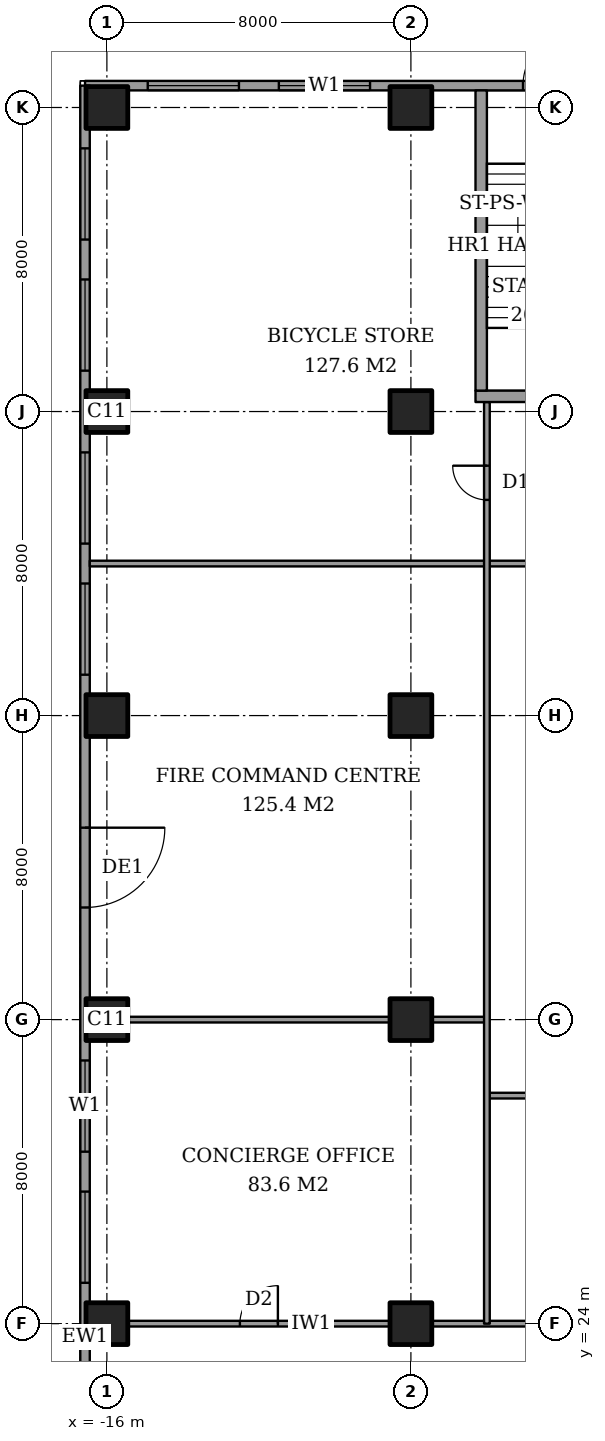
"""IFC4 building model, lengths in metres.
Left out: names, types, materials, properties, quantities, classifications, styles, units other than length and angle.
Written with IfcOpenShell. Run it as: python <this file> out.ifc"""

import sys

from ifc_helpers import new_model, si_unit, direction, frame, frame_2d, origin, origin_2d, place, context, subcontext, project, spatial, rectangle, extrude, element, fill, save


model = new_model("IFC4")
c1 = context("Model", 3, precision=1e-05, world=origin(), true_north=direction((0.0, 1.0)))
c2 = subcontext(c1, "Body", "Model", "MODEL_VIEW")
j1 = project(units=[si_unit("LENGTHUNIT", "METRE"), si_unit("PLANEANGLEUNIT", "RADIAN")], contexts=[c1])
p1 = place(None, origin())
s1 = spatial("IfcSite", under=j1, at=p1, CompositionType="ELEMENT")
p2 = place(p1, origin())
s2 = spatial("IfcBuilding", under=s1, at=p2, CompositionType="ELEMENT")
p3 = place(p2, origin())
s3 = spatial("IfcBuildingStorey", under=s2, at=p3, CompositionType="ELEMENT", Elevation=0.0)
for number, where, z_axis, x_axis in (
    (1, (-16.0, 24.0, 0.0), (0.0, 0.0, 1.0), (1.0, 0.0, 0.0)),
    (2, (-16.0, 32.0, 0.0), (0.0, 0.0, 1.0), (1.0, 0.0, 0.0)),
    (3, (-16.0, 40.0, 0.0), (0.0, 0.0, 1.0), (1.0, 0.0, 0.0)),
    (4, (-16.0, 48.0, 0.0), (0.0, 0.0, 1.0), (1.0, 0.0, 0.0)),
    (5, (-16.0, 56.0, 0.0), (0.0, 0.0, 1.0), (1.0, 0.0, 0.0)),
    (6, (-8.0, 24.0, 0.0), (0.0, 0.0, 1.0), (1.0, 0.0, 0.0)),
    (7, (-8.0, 32.0, 0.0), (0.0, 0.0, 1.0), (1.0, 0.0, 0.0)),
    (8, (-8.0, 40.0, 0.0), (0.0, 0.0, 1.0), (1.0, 0.0, 0.0)),
    (9, (-8.0, 48.0, 0.0), (0.0, 0.0, 1.0), (1.0, 0.0, 0.0)),
    (10, (-8.0, 56.0, 0.0), (0.0, 0.0, 1.0), (1.0, 0.0, 0.0)),
):
    element("IfcColumn", number, at=place(p3, frame(where, z_axis=z_axis, x_axis=x_axis)), inside=s3, PredefinedType="COLUMN", context=c2, shape_type="SweptSolid", body=[
        extrude(rectangle(XDim=1.1, YDim=1.1, at=origin_2d()), origin(), (0.0, 0.0, 1.0), 6.0),
    ])
p4 = place(p3, frame((74.825, 56.575, 0.0), z_axis=(0.0, 0.0, 1.0), x_axis=(-1.0, 0.0, 0.0)))
e11 = element("IfcWall", 11, at=p4, inside=s3, PredefinedType="SOLIDWALL", context=c2, shape_type="SweptSolid", body=[
    extrude(rectangle(XDim=91.4, YDim=0.25, at=frame_2d((45.7, 0.0))), origin(), (0.0, 0.0, 1.0), 6.0),
])
p5 = place(p4, frame((27.025, 0.0, 0.0)))
e12 = element("IfcOpeningElement", 12, at=p5, cuts=e11, PredefinedType="OPENING", context=c2, shape_type="SweptSolid", body=[
    extrude(rectangle(XDim=3.6, YDim=3.6, at=frame_2d((1.8, 1.8))), frame((0.0, 0.135, 0.0), z_axis=(0.0, -1.0, 0.0), x_axis=(1.0, 0.0, 0.0)), (0.0, 0.0, 1.0), 0.27),
])
p6 = place(p4, frame((9.863, 0.0, 0.3)))
e13 = element("IfcOpeningElement", 13, at=p6, cuts=e11, PredefinedType="OPENING", context=c2, shape_type="SweptSolid", body=[
    extrude(rectangle(XDim=2.4, YDim=3.6, at=frame_2d((1.2, 1.8))), frame((0.0, 0.135, 0.0), z_axis=(0.0, -1.0, 0.0), x_axis=(1.0, 0.0, 0.0)), (0.0, 0.0, 1.0), 0.27),
])
p7 = place(p4, frame((13.238, 0.0, 0.3)))
e14 = element("IfcOpeningElement", 14, at=p7, cuts=e11, PredefinedType="OPENING", context=c2, shape_type="SweptSolid", body=[
    extrude(rectangle(XDim=2.4, YDim=3.6, at=frame_2d((1.2, 1.8))), frame((0.0, 0.135, 0.0), z_axis=(0.0, -1.0, 0.0), x_axis=(1.0, 0.0, 0.0)), (0.0, 0.0, 1.0), 0.27),
])
p8 = place(p4, frame((17.975, 0.0, 0.3)))
e15 = element("IfcOpeningElement", 15, at=p8, cuts=e11, PredefinedType="OPENING", context=c2, shape_type="SweptSolid", body=[
    extrude(rectangle(XDim=2.4, YDim=3.6, at=frame_2d((1.2, 1.8))), frame((0.0, 0.135, 0.0), z_axis=(0.0, -1.0, 0.0), x_axis=(1.0, 0.0, 0.0)), (0.0, 0.0, 1.0), 0.27),
])
p9 = place(p4, frame((21.275, 0.0, 0.3)))
e16 = element("IfcOpeningElement", 16, at=p9, cuts=e11, PredefinedType="OPENING", context=c2, shape_type="SweptSolid", body=[
    extrude(rectangle(XDim=2.4, YDim=3.6, at=frame_2d((1.2, 1.8))), frame((0.0, 0.135, 0.0), z_axis=(0.0, -1.0, 0.0), x_axis=(1.0, 0.0, 0.0)), (0.0, 0.0, 1.0), 0.27),
])
p10 = place(p4, frame((34.15, 0.0, 0.3)))
e17 = element("IfcOpeningElement", 17, at=p10, cuts=e11, PredefinedType="OPENING", context=c2, shape_type="SweptSolid", body=[
    extrude(rectangle(XDim=2.4, YDim=3.6, at=frame_2d((1.2, 1.8))), frame((0.0, 0.135, 0.0), z_axis=(0.0, -1.0, 0.0), x_axis=(1.0, 0.0, 0.0)), (0.0, 0.0, 1.0), 0.27),
])
p11 = place(p4, frame((38.1, 0.0, 0.3)))
e18 = element("IfcOpeningElement", 18, at=p11, cuts=e11, PredefinedType="OPENING", context=c2, shape_type="SweptSolid", body=[
    extrude(rectangle(XDim=2.4, YDim=3.6, at=frame_2d((1.2, 1.8))), frame((0.0, 0.135, 0.0), z_axis=(0.0, -1.0, 0.0), x_axis=(1.0, 0.0, 0.0)), (0.0, 0.0, 1.0), 0.27),
])
p12 = place(p4, frame((43.15, 0.0, 0.3)))
e19 = element("IfcOpeningElement", 19, at=p12, cuts=e11, PredefinedType="OPENING", context=c2, shape_type="SweptSolid", body=[
    extrude(rectangle(XDim=2.4, YDim=3.6, at=frame_2d((1.2, 1.8))), frame((0.0, 0.135, 0.0), z_axis=(0.0, -1.0, 0.0), x_axis=(1.0, 0.0, 0.0)), (0.0, 0.0, 1.0), 0.27),
])
p13 = place(p4, frame((47.1, 0.0, 0.3)))
e20 = element("IfcOpeningElement", 20, at=p13, cuts=e11, PredefinedType="OPENING", context=c2, shape_type="SweptSolid", body=[
    extrude(rectangle(XDim=2.4, YDim=3.6, at=frame_2d((1.2, 1.8))), frame((0.0, 0.135, 0.0), z_axis=(0.0, -1.0, 0.0), x_axis=(1.0, 0.0, 0.0)), (0.0, 0.0, 1.0), 0.27),
])
p14 = place(p4, frame((53.775, 0.0, 0.0)))
e21 = element("IfcOpeningElement", 21, at=p14, cuts=e11, PredefinedType="OPENING", context=c2, shape_type="SweptSolid", body=[
    extrude(rectangle(XDim=2.1, YDim=2.4, at=frame_2d((1.05, 1.2))), frame((0.0, 0.135, 0.0), z_axis=(0.0, -1.0, 0.0), x_axis=(1.0, 0.0, 0.0)), (0.0, 0.0, 1.0), 0.27),
])
p15 = place(p4, frame((61.775, 0.0, 0.0)))
e22 = element("IfcOpeningElement", 22, at=p15, cuts=e11, PredefinedType="OPENING", context=c2, shape_type="SweptSolid", body=[
    extrude(rectangle(XDim=2.1, YDim=2.4, at=frame_2d((1.05, 1.2))), frame((0.0, 0.135, 0.0), z_axis=(0.0, -1.0, 0.0), x_axis=(1.0, 0.0, 0.0)), (0.0, 0.0, 1.0), 0.27),
])
p16 = place(p4, frame((69.775, 0.0, 0.0)))
e23 = element("IfcOpeningElement", 23, at=p16, cuts=e11, PredefinedType="OPENING", context=c2, shape_type="SweptSolid", body=[
    extrude(rectangle(XDim=2.1, YDim=2.4, at=frame_2d((1.05, 1.2))), frame((0.0, 0.135, 0.0), z_axis=(0.0, -1.0, 0.0), x_axis=(1.0, 0.0, 0.0)), (0.0, 0.0, 1.0), 0.27),
])
p17 = place(p4, frame((83.9, 0.0, 0.3)))
e24 = element("IfcOpeningElement", 24, at=p17, cuts=e11, PredefinedType="OPENING", context=c2, shape_type="SweptSolid", body=[
    extrude(rectangle(XDim=2.4, YDim=3.6, at=frame_2d((1.2, 1.8))), frame((0.0, 0.135, 0.0), z_axis=(0.0, -1.0, 0.0), x_axis=(1.0, 0.0, 0.0)), (0.0, 0.0, 1.0), 0.27),
])
p18 = place(p4, frame((87.35, 0.0, 0.3)))
e25 = element("IfcOpeningElement", 25, at=p18, cuts=e11, PredefinedType="OPENING", context=c2, shape_type="SweptSolid", body=[
    extrude(rectangle(XDim=2.4, YDim=3.6, at=frame_2d((1.2, 1.8))), frame((0.0, 0.135, 0.0), z_axis=(0.0, -1.0, 0.0), x_axis=(1.0, 0.0, 0.0)), (0.0, 0.0, 1.0), 0.27),
])
p19 = place(p4, frame((5.275, 0.0, 0.0), z_axis=(0.0, 0.0, 1.0), x_axis=(-1.0, 0.0, 0.0)))
e26 = element("IfcOpeningElement", 26, at=p19, cuts=e11, PredefinedType="OPENING", context=c2, shape_type="SweptSolid", body=[
    extrude(rectangle(XDim=1.5, YDim=2.1, at=frame_2d((0.75, 1.05))), frame((0.0, 0.135, 0.0), z_axis=(0.0, -1.0, 0.0), x_axis=(1.0, 0.0, 0.0)), (0.0, 0.0, 1.0), 0.27),
])
p20 = place(p4, frame((79.875, 0.0, 0.0), z_axis=(0.0, 0.0, 1.0), x_axis=(-1.0, 0.0, 0.0)))
e27 = element("IfcOpeningElement", 27, at=p20, cuts=e11, PredefinedType="OPENING", context=c2, shape_type="SweptSolid", body=[
    extrude(rectangle(XDim=1.5, YDim=2.1, at=frame_2d((0.75, 1.05))), frame((0.0, 0.135, 0.0), z_axis=(0.0, -1.0, 0.0), x_axis=(1.0, 0.0, 0.0)), (0.0, 0.0, 1.0), 0.27),
])
p21 = place(p3, frame((-16.575, 56.575, 0.0), z_axis=(0.0, 0.0, 1.0), x_axis=(0.0, -1.0, 0.0)))
e28 = element("IfcWall", 28, at=p21, inside=s3, PredefinedType="SOLIDWALL", context=c2, shape_type="SweptSolid", body=[
    extrude(rectangle(XDim=73.15, YDim=0.25, at=frame_2d((36.575, 0.0))), origin(), (0.0, 0.0, 1.0), 6.0),
])
p22 = place(p21, frame((1.65, 0.0, 0.3)))
e29 = element("IfcOpeningElement", 29, at=p22, cuts=e28, PredefinedType="OPENING", context=c2, shape_type="SweptSolid", body=[
    extrude(rectangle(XDim=2.4, YDim=3.6, at=frame_2d((1.2, 1.8))), frame((0.0, 0.135, 0.0), z_axis=(0.0, -1.0, 0.0), x_axis=(1.0, 0.0, 0.0)), (0.0, 0.0, 1.0), 0.27),
])
p23 = place(p21, frame((5.1, 0.0, 0.3)))
e30 = element("IfcOpeningElement", 30, at=p23, cuts=e28, PredefinedType="OPENING", context=c2, shape_type="SweptSolid", body=[
    extrude(rectangle(XDim=2.4, YDim=3.6, at=frame_2d((1.2, 1.8))), frame((0.0, 0.135, 0.0), z_axis=(0.0, -1.0, 0.0), x_axis=(1.0, 0.0, 0.0)), (0.0, 0.0, 1.0), 0.27),
])
p24 = place(p21, frame((9.65, 0.0, 0.3)))
e31 = element("IfcOpeningElement", 31, at=p24, cuts=e28, PredefinedType="OPENING", context=c2, shape_type="SweptSolid", body=[
    extrude(rectangle(XDim=2.4, YDim=3.6, at=frame_2d((1.2, 1.8))), frame((0.0, 0.135, 0.0), z_axis=(0.0, -1.0, 0.0), x_axis=(1.0, 0.0, 0.0)), (0.0, 0.0, 1.0), 0.27),
])
p25 = place(p21, frame((19.525, 0.0, 0.0)))
e32 = element("IfcOpeningElement", 32, at=p25, cuts=e28, PredefinedType="OPENING", context=c2, shape_type="SweptSolid", body=[
    extrude(rectangle(XDim=2.1, YDim=2.4, at=frame_2d((1.05, 1.2))), frame((0.0, 0.135, 0.0), z_axis=(0.0, -1.0, 0.0), x_axis=(1.0, 0.0, 0.0)), (0.0, 0.0, 1.0), 0.27),
])
p26 = place(p21, frame((13.1, 0.0, 0.3)))
e33 = element("IfcOpeningElement", 33, at=p26, cuts=e28, PredefinedType="OPENING", context=c2, shape_type="SweptSolid", body=[
    extrude(rectangle(XDim=2.4, YDim=3.6, at=frame_2d((1.2, 1.8))), frame((0.0, 0.135, 0.0), z_axis=(0.0, -1.0, 0.0), x_axis=(1.0, 0.0, 0.0)), (0.0, 0.0, 1.0), 0.27),
])
p27 = place(p21, frame((25.65, 0.0, 0.3)))
e34 = element("IfcOpeningElement", 34, at=p27, cuts=e28, PredefinedType="OPENING", context=c2, shape_type="SweptSolid", body=[
    extrude(rectangle(XDim=2.4, YDim=3.6, at=frame_2d((1.2, 1.8))), frame((0.0, 0.135, 0.0), z_axis=(0.0, -1.0, 0.0), x_axis=(1.0, 0.0, 0.0)), (0.0, 0.0, 1.0), 0.27),
])
p28 = place(p21, frame((29.1, 0.0, 0.3)))
e35 = element("IfcOpeningElement", 35, at=p28, cuts=e28, PredefinedType="OPENING", context=c2, shape_type="SweptSolid", body=[
    extrude(rectangle(XDim=2.4, YDim=3.6, at=frame_2d((1.2, 1.8))), frame((0.0, 0.135, 0.0), z_axis=(0.0, -1.0, 0.0), x_axis=(1.0, 0.0, 0.0)), (0.0, 0.0, 1.0), 0.27),
])
p29 = place(p21, frame((35.525, 0.0, 0.0)))
e36 = element("IfcOpeningElement", 36, at=p29, cuts=e28, PredefinedType="OPENING", context=c2, shape_type="SweptSolid", body=[
    extrude(rectangle(XDim=2.1, YDim=2.4, at=frame_2d((1.05, 1.2))), frame((0.0, 0.135, 0.0), z_axis=(0.0, -1.0, 0.0), x_axis=(1.0, 0.0, 0.0)), (0.0, 0.0, 1.0), 0.27),
])
p30 = place(p21, frame((43.525, 0.0, 0.0)))
e37 = element("IfcOpeningElement", 37, at=p30, cuts=e28, PredefinedType="OPENING", context=c2, shape_type="SweptSolid", body=[
    extrude(rectangle(XDim=2.1, YDim=2.4, at=frame_2d((1.05, 1.2))), frame((0.0, 0.135, 0.0), z_axis=(0.0, -1.0, 0.0), x_axis=(1.0, 0.0, 0.0)), (0.0, 0.0, 1.0), 0.27),
])
p31 = place(p21, frame((51.525, 0.0, 0.0)))
e38 = element("IfcOpeningElement", 38, at=p31, cuts=e28, PredefinedType="OPENING", context=c2, shape_type="SweptSolid", body=[
    extrude(rectangle(XDim=2.1, YDim=2.4, at=frame_2d((1.05, 1.2))), frame((0.0, 0.135, 0.0), z_axis=(0.0, -1.0, 0.0), x_axis=(1.0, 0.0, 0.0)), (0.0, 0.0, 1.0), 0.27),
])
p32 = place(p21, frame((57.525, 0.0, 0.0)))
e39 = element("IfcOpeningElement", 39, at=p32, cuts=e28, PredefinedType="OPENING", context=c2, shape_type="SweptSolid", body=[
    extrude(rectangle(XDim=2.1, YDim=2.4, at=frame_2d((1.05, 1.2))), frame((0.0, 0.135, 0.0), z_axis=(0.0, -1.0, 0.0), x_axis=(1.0, 0.0, 0.0)), (0.0, 0.0, 1.0), 0.27),
])
p33 = place(p21, frame((61.1, 0.0, 0.3)))
e40 = element("IfcOpeningElement", 40, at=p33, cuts=e28, PredefinedType="OPENING", context=c2, shape_type="SweptSolid", body=[
    extrude(rectangle(XDim=2.4, YDim=3.6, at=frame_2d((1.2, 1.8))), frame((0.0, 0.135, 0.0), z_axis=(0.0, -1.0, 0.0), x_axis=(1.0, 0.0, 0.0)), (0.0, 0.0, 1.0), 0.27),
])
p34 = place(p21, frame((65.65, 0.0, 0.3)))
e41 = element("IfcOpeningElement", 41, at=p34, cuts=e28, PredefinedType="OPENING", context=c2, shape_type="SweptSolid", body=[
    extrude(rectangle(XDim=2.4, YDim=3.6, at=frame_2d((1.2, 1.8))), frame((0.0, 0.135, 0.0), z_axis=(0.0, -1.0, 0.0), x_axis=(1.0, 0.0, 0.0)), (0.0, 0.0, 1.0), 0.27),
])
p35 = place(p21, frame((69.1, 0.0, 0.3)))
e42 = element("IfcOpeningElement", 42, at=p35, cuts=e28, PredefinedType="OPENING", context=c2, shape_type="SweptSolid", body=[
    extrude(rectangle(XDim=2.4, YDim=3.6, at=frame_2d((1.2, 1.8))), frame((0.0, 0.135, 0.0), z_axis=(0.0, -1.0, 0.0), x_axis=(1.0, 0.0, 0.0)), (0.0, 0.0, 1.0), 0.27),
])
p36 = place(p3, frame((-15.45, 24.0, 0.0), z_axis=(0.0, 0.0, 1.0), x_axis=(1.0, 0.0, 0.0)))
e43 = element("IfcWall", 43, at=p36, inside=s3, PredefinedType="PARTITIONING", context=c2, shape_type="SweptSolid", body=[
    extrude(rectangle(XDim=6.9, YDim=0.15, at=frame_2d((3.45, 0.0))), origin(), (0.0, 0.0, 1.0), 4.3),
])
p37 = place(p36, frame((2.95, 0.0, 0.0)))
e44 = element("IfcOpeningElement", 44, at=p37, cuts=e43, PredefinedType="OPENING", context=c2, shape_type="SweptSolid", body=[
    extrude(rectangle(XDim=1.0, YDim=2.1, at=frame_2d((0.5, 1.05))), frame((0.0, 0.085, 0.0), z_axis=(0.0, -1.0, 0.0), x_axis=(1.0, 0.0, 0.0)), (0.0, 0.0, 1.0), 0.17),
])
p38 = place(p3, frame((-7.45, 24.0, 0.0), z_axis=(0.0, 0.0, 1.0), x_axis=(1.0, 0.0, 0.0)))
e45 = element("IfcWall", 45, at=p38, inside=s3, PredefinedType="PARTITIONING", context=c2, shape_type="SweptSolid", body=[
    extrude(rectangle(XDim=6.8, YDim=0.15, at=frame_2d((3.4, 0.0))), origin(), (0.0, 0.0, 1.0), 4.3),
])
p39 = place(p3, frame((-6.0, 30.0, 0.0), z_axis=(0.0, 0.0, 1.0), x_axis=(1.0, 0.0, 0.0)))
e46 = element("IfcWall", 46, at=p39, inside=s3, PredefinedType="PARTITIONING", context=c2, shape_type="SweptSolid", body=[
    extrude(rectangle(XDim=22.0, YDim=0.15, at=frame_2d((11.0, 0.0))), origin(), (0.0, 0.0, 1.0), 5.7),
])
p40 = place(p39, frame((7.15, 0.0, 0.0)))
e47 = element("IfcOpeningElement", 47, at=p40, cuts=e46, PredefinedType="OPENING", context=c2, shape_type="SweptSolid", body=[
    extrude(rectangle(XDim=0.9, YDim=2.1, at=frame_2d((0.45, 1.05))), frame((0.0, 0.085, 0.0), z_axis=(0.0, -1.0, 0.0), x_axis=(1.0, 0.0, 0.0)), (0.0, 0.0, 1.0), 0.17),
])
p41 = place(p39, frame((17.5, 0.0, 0.0)))
e48 = element("IfcOpeningElement", 48, at=p41, cuts=e46, PredefinedType="OPENING", context=c2, shape_type="SweptSolid", body=[
    extrude(rectangle(XDim=1.0, YDim=2.1, at=frame_2d((0.5, 1.05))), frame((0.0, 0.085, 0.0), z_axis=(0.0, -1.0, 0.0), x_axis=(1.0, 0.0, 0.0)), (0.0, 0.0, 1.0), 0.17),
])
p42 = place(p3, frame((-15.45, 32.0, 0.0), z_axis=(0.0, 0.0, 1.0), x_axis=(1.0, 0.0, 0.0)))
e49 = element("IfcWall", 49, at=p42, inside=s3, PredefinedType="PARTITIONING", context=c2, shape_type="SweptSolid", body=[
    extrude(rectangle(XDim=6.9, YDim=0.15, at=frame_2d((3.45, 0.0))), origin(), (0.0, 0.0, 1.0), 4.3),
])
p43 = place(p3, frame((-7.45, 32.0, 0.0), z_axis=(0.0, 0.0, 1.0), x_axis=(1.0, 0.0, 0.0)))
e50 = element("IfcWall", 50, at=p43, inside=s3, PredefinedType="PARTITIONING", context=c2, shape_type="SweptSolid", body=[
    extrude(rectangle(XDim=1.45, YDim=0.15, at=frame_2d((0.725, 0.0))), origin(), (0.0, 0.0, 1.0), 4.3),
])
p44 = place(p3, frame((-16.45, 44.0, 0.0), z_axis=(0.0, 0.0, 1.0), x_axis=(1.0, 0.0, 0.0)))
e51 = element("IfcWall", 51, at=p44, inside=s3, PredefinedType="PARTITIONING", context=c2, shape_type="SweptSolid", body=[
    extrude(rectangle(XDim=32.45, YDim=0.15, at=frame_2d((16.225, 0.0))), origin(), (0.0, 0.0, 1.0), 5.7),
])
p45 = place(p3, frame((-6.0, 24.0, 0.0), z_axis=(0.0, 0.0, 1.0), x_axis=(0.0, 1.0, 0.0)))
e52 = element("IfcWall", 52, at=p45, inside=s3, PredefinedType="PARTITIONING", context=c2, shape_type="SweptSolid", body=[
    extrude(rectangle(XDim=24.25, YDim=0.15, at=frame_2d((12.125, 0.0))), origin(), (0.0, 0.0, 1.0), 5.7),
])
p46 = place(p45, frame((21.675, 0.0, 0.0)))
e53 = element("IfcOpeningElement", 53, at=p46, cuts=e52, PredefinedType="OPENING", context=c2, shape_type="SweptSolid", body=[
    extrude(rectangle(XDim=0.9, YDim=2.1, at=frame_2d((0.45, 1.05))), frame((0.0, 0.085, 0.0), z_axis=(0.0, -1.0, 0.0), x_axis=(1.0, 0.0, 0.0)), (0.0, 0.0, 1.0), 0.17),
])
p47 = place(p3, frame((-6.3, 48.4, 0.0), z_axis=(0.0, 0.0, 1.0), x_axis=(1.0, 0.0, 0.0)))
e54 = element("IfcWall", 54, at=p47, inside=s3, PredefinedType="PARTITIONING", context=c2, shape_type="SweptSolid", body=[
    extrude(rectangle(XDim=4.0, YDim=0.3, at=frame_2d((2.0, 0.0))), origin(), (0.0, 0.0, 1.0), 6.0),
])
p48 = place(p3, frame((-6.15, 48.55, 0.0), z_axis=(0.0, 0.0, 1.0), x_axis=(0.0, 1.0, 0.0)))
e55 = element("IfcWall", 55, at=p48, inside=s3, PredefinedType="PARTITIONING", context=c2, shape_type="SweptSolid", body=[
    extrude(rectangle(XDim=7.9, YDim=0.3, at=frame_2d((3.95, 0.0))), origin(), (0.0, 0.0, 1.0), 6.0),
])
p49 = place(p17, origin())
e56 = element("IfcWindow", 56, at=p49, inside=s3, PartitioningType="SINGLE_PANEL", PredefinedType="WINDOW", context=c2, shape_type="SweptSolid", body=[
    extrude(rectangle(XDim=2.4, YDim=3.6, at=frame_2d((1.2, 1.8))), frame((0.0, 0.03, 0.0), z_axis=(0.0, -1.0, 0.0), x_axis=(1.0, 0.0, 0.0)), (0.0, 0.0, 1.0), 0.06),
])
fill(e24, e56)
p50 = place(p18, origin())
e57 = element("IfcWindow", 57, at=p50, inside=s3, PartitioningType="SINGLE_PANEL", PredefinedType="WINDOW", context=c2, shape_type="SweptSolid", body=[
    extrude(rectangle(XDim=2.4, YDim=3.6, at=frame_2d((1.2, 1.8))), frame((0.0, 0.03, 0.0), z_axis=(0.0, -1.0, 0.0), x_axis=(1.0, 0.0, 0.0)), (0.0, 0.0, 1.0), 0.06),
])
fill(e25, e57)
p51 = place(p22, origin())
e58 = element("IfcWindow", 58, at=p51, inside=s3, PartitioningType="SINGLE_PANEL", PredefinedType="WINDOW", context=c2, shape_type="SweptSolid", body=[
    extrude(rectangle(XDim=2.4, YDim=3.6, at=frame_2d((1.2, 1.8))), frame((0.0, 0.03, 0.0), z_axis=(0.0, -1.0, 0.0), x_axis=(1.0, 0.0, 0.0)), (0.0, 0.0, 1.0), 0.06),
])
fill(e29, e58)
p52 = place(p23, origin())
e59 = element("IfcWindow", 59, at=p52, inside=s3, PartitioningType="SINGLE_PANEL", PredefinedType="WINDOW", context=c2, shape_type="SweptSolid", body=[
    extrude(rectangle(XDim=2.4, YDim=3.6, at=frame_2d((1.2, 1.8))), frame((0.0, 0.03, 0.0), z_axis=(0.0, -1.0, 0.0), x_axis=(1.0, 0.0, 0.0)), (0.0, 0.0, 1.0), 0.06),
])
fill(e30, e59)
p53 = place(p24, origin())
e60 = element("IfcWindow", 60, at=p53, inside=s3, PartitioningType="SINGLE_PANEL", PredefinedType="WINDOW", context=c2, shape_type="SweptSolid", body=[
    extrude(rectangle(XDim=2.4, YDim=3.6, at=frame_2d((1.2, 1.8))), frame((0.0, 0.03, 0.0), z_axis=(0.0, -1.0, 0.0), x_axis=(1.0, 0.0, 0.0)), (0.0, 0.0, 1.0), 0.06),
])
fill(e31, e60)
p54 = place(p25, origin())
e61 = element("IfcDoor", 61, at=p54, inside=s3, OperationType="DOUBLE_DOOR_DOUBLE_SWING", PredefinedType="DOOR", context=c2, shape_type="SweptSolid", body=[
    extrude(rectangle(XDim=2.1, YDim=2.4, at=frame_2d((1.05, 1.2))), frame((0.0, 0.025, 0.0), z_axis=(0.0, -1.0, 0.0), x_axis=(1.0, 0.0, 0.0)), (0.0, 0.0, 1.0), 0.05),
])
fill(e32, e61)
p55 = place(p26, origin())
e62 = element("IfcWindow", 62, at=p55, inside=s3, PartitioningType="SINGLE_PANEL", PredefinedType="WINDOW", context=c2, shape_type="SweptSolid", body=[
    extrude(rectangle(XDim=2.4, YDim=3.6, at=frame_2d((1.2, 1.8))), frame((0.0, 0.03, 0.0), z_axis=(0.0, -1.0, 0.0), x_axis=(1.0, 0.0, 0.0)), (0.0, 0.0, 1.0), 0.06),
])
fill(e33, e62)
p56 = place(p27, origin())
e63 = element("IfcWindow", 63, at=p56, inside=s3, PartitioningType="SINGLE_PANEL", PredefinedType="WINDOW", context=c2, shape_type="SweptSolid", body=[
    extrude(rectangle(XDim=2.4, YDim=3.6, at=frame_2d((1.2, 1.8))), frame((0.0, 0.03, 0.0), z_axis=(0.0, -1.0, 0.0), x_axis=(1.0, 0.0, 0.0)), (0.0, 0.0, 1.0), 0.06),
])
fill(e34, e63)
p57 = place(p28, origin())
e64 = element("IfcWindow", 64, at=p57, inside=s3, PartitioningType="SINGLE_PANEL", PredefinedType="WINDOW", context=c2, shape_type="SweptSolid", body=[
    extrude(rectangle(XDim=2.4, YDim=3.6, at=frame_2d((1.2, 1.8))), frame((0.0, 0.03, 0.0), z_axis=(0.0, -1.0, 0.0), x_axis=(1.0, 0.0, 0.0)), (0.0, 0.0, 1.0), 0.06),
])
fill(e35, e64)
p58 = place(p37, origin())
e65 = element("IfcDoor", 65, at=p58, inside=s3, OperationType="SINGLE_SWING_LEFT", PredefinedType="DOOR", context=c2, shape_type="SweptSolid", body=[
    extrude(rectangle(XDim=1.0, YDim=2.1, at=frame_2d((0.5, 1.05))), frame((0.0, 0.025, 0.0), z_axis=(0.0, -1.0, 0.0), x_axis=(1.0, 0.0, 0.0)), (0.0, 0.0, 1.0), 0.05),
])
fill(e44, e65)
p59 = place(p46, origin())
e66 = element("IfcDoor", 66, at=p59, inside=s3, OperationType="SINGLE_SWING_LEFT", PredefinedType="DOOR", context=c2, shape_type="SweptSolid", body=[
    extrude(rectangle(XDim=0.9, YDim=2.1, at=frame_2d((0.45, 1.05))), frame((0.0, 0.025, 0.0), z_axis=(0.0, -1.0, 0.0), x_axis=(1.0, 0.0, 0.0)), (0.0, 0.0, 1.0), 0.05),
])
fill(e53, e66)
p60 = place(p20, origin())
e67 = element("IfcDoor", 67, at=p60, inside=s3, OperationType="DOUBLE_DOOR_SINGLE_SWING", PredefinedType="DOOR", context=c2, shape_type="SweptSolid", body=[
    extrude(rectangle(XDim=1.5, YDim=2.1, at=frame_2d((0.75, 1.05))), frame((0.0, 0.025, 0.0), z_axis=(0.0, -1.0, 0.0), x_axis=(1.0, 0.0, 0.0)), (0.0, 0.0, 1.0), 0.05),
])
fill(e27, e67)
save(model, sys.argv[1])
